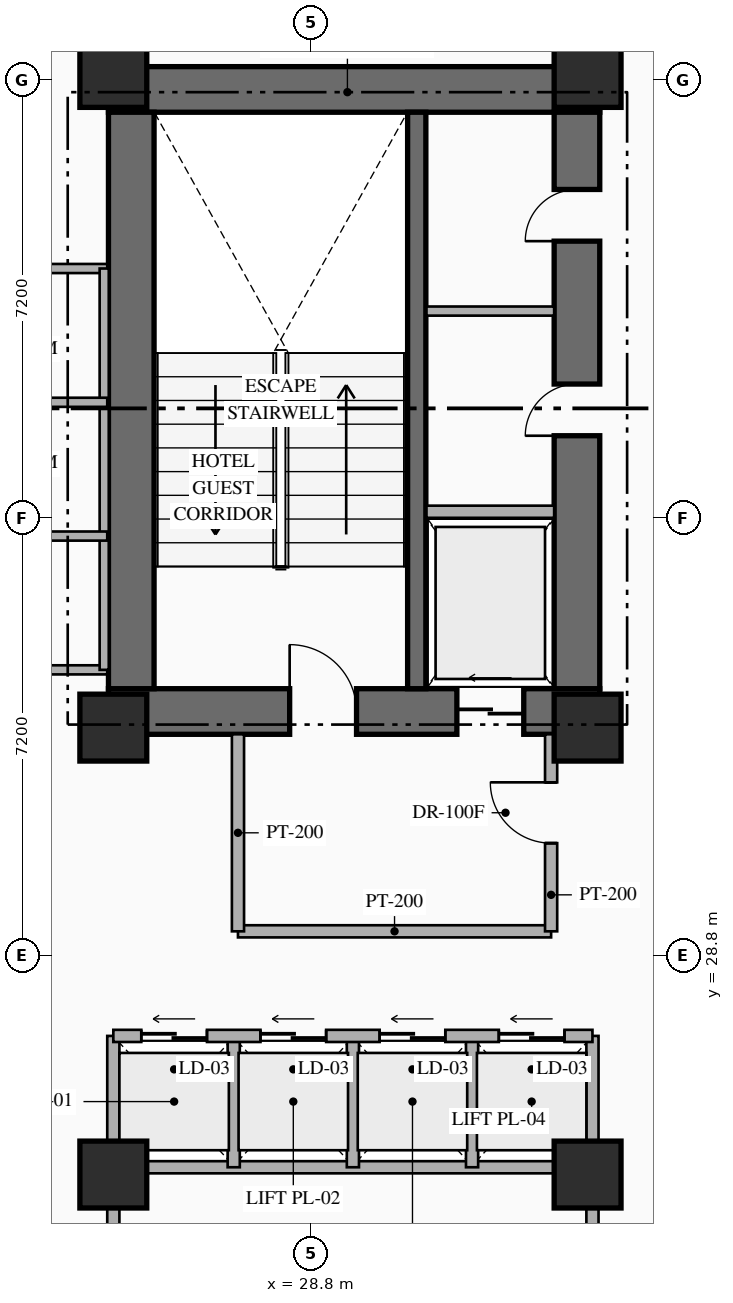
"""IFC4 building model, lengths in metres.
Left out: names, types, materials, properties, quantities, classifications, styles, units other than length and angle.
Written with IfcOpenShell. Run it as: python <this file> out.ifc"""

import sys

from ifc_helpers import new_model, si_unit, direction, frame, frame_2d, origin, origin_2d, place, context, subcontext, project, spatial, rectangle, hollow_rectangle, extrude, element, fill, save


model = new_model("IFC4")
c1 = context("Model", 3, precision=1e-05, world=origin(), true_north=direction((0.0, 1.0)))
c2 = subcontext(c1, "Body", "Model", "MODEL_VIEW")
j1 = project(units=[si_unit("LENGTHUNIT", "METRE"), si_unit("PLANEANGLEUNIT", "RADIAN")], contexts=[c1])
p1 = place(None, origin())
s1 = spatial("IfcSite", under=j1, at=p1, CompositionType="ELEMENT")
p2 = place(p1, origin())
s2 = spatial("IfcBuilding", under=s1, at=p2, CompositionType="ELEMENT")
p3 = place(p2, frame((0.0, 0.0, 46.65)))
s3 = spatial("IfcBuildingStorey", under=s2, at=p3, CompositionType="ELEMENT", Elevation=46.65)
p4 = place(p3, frame((25.47, 32.815, 0.0), z_axis=(0.0, 0.0, 1.0), x_axis=(1.0, 0.0, 0.0)))
e1 = element("IfcWall", 1, at=p4, inside=s3, PredefinedType="SHEAR", context=c2, shape_type="SweptSolid", body=[
    extrude(rectangle(XDim=8.08, YDim=0.75, at=frame_2d((4.04, 0.0))), origin(), (0.0, 0.0, 1.0), 3.35),
])
p5 = place(p4, frame((2.98, 0.0, 0.0)))
e2 = element("IfcOpeningElement", 2, at=p5, cuts=e1, PredefinedType="OPENING", context=c2, shape_type="SweptSolid", body=[
    extrude(rectangle(XDim=1.1, YDim=2.2, at=frame_2d((0.55, 1.1))), frame((0.0, 0.385, 0.0), z_axis=(0.0, -1.0, 0.0), x_axis=(1.0, 0.0, 0.0)), (0.0, 0.0, 1.0), 0.77),
])
p6 = place(p4, frame((5.73, 0.0, 0.0)))
e3 = element("IfcOpeningElement", 3, at=p6, cuts=e1, PredefinedType="OPENING", context=c2, shape_type="SweptSolid", body=[
    extrude(rectangle(XDim=1.1, YDim=2.15, at=frame_2d((0.55, 1.075))), frame((0.0, 0.385, 0.0), z_axis=(0.0, -1.0, 0.0), x_axis=(1.0, 0.0, 0.0)), (0.0, 0.0, 1.0), 0.77),
])
p7 = place(p3, frame((25.47, 43.045, 0.0), z_axis=(0.0, 0.0, 1.0), x_axis=(1.0, 0.0, 0.0)))
e4 = element("IfcWall", 4, at=p7, inside=s3, PredefinedType="SHEAR", context=c2, shape_type="SweptSolid", body=[
    extrude(rectangle(XDim=8.08, YDim=0.75, at=frame_2d((4.04, 0.0))), origin(), (0.0, 0.0, 1.0), 3.35),
])
p8 = place(p3, frame((25.845, 33.19, 0.0), z_axis=(0.0, 0.0, 1.0), x_axis=(0.0, 1.0, 0.0)))
e5 = element("IfcWall", 5, at=p8, inside=s3, PredefinedType="SHEAR", context=c2, shape_type="SweptSolid", body=[
    extrude(rectangle(XDim=9.48, YDim=0.75, at=frame_2d((4.74, 0.0))), origin(), (0.0, 0.0, 1.0), 3.35),
])
p9 = place(p3, frame((33.175, 33.19, 0.0), z_axis=(0.0, 0.0, 1.0), x_axis=(0.0, 1.0, 0.0)))
e6 = element("IfcWall", 6, at=p9, inside=s3, PredefinedType="SHEAR", context=c2, shape_type="SweptSolid", body=[
    extrude(rectangle(XDim=9.48, YDim=0.75, at=frame_2d((4.74, 0.0))), origin(), (0.0, 0.0, 1.0), 3.35),
])
p10 = place(p9, frame((4.16, 0.0, 0.0)))
e7 = element("IfcOpeningElement", 7, at=p10, cuts=e6, PredefinedType="OPENING", context=c2, shape_type="SweptSolid", body=[
    extrude(rectangle(XDim=0.85, YDim=2.08, at=frame_2d((0.425, 1.04))), frame((0.0, 0.385, 0.0), z_axis=(0.0, -1.0, 0.0), x_axis=(1.0, 0.0, 0.0)), (0.0, 0.0, 1.0), 0.77),
])
p11 = place(p9, frame((7.36, 0.0, 0.0)))
e8 = element("IfcOpeningElement", 8, at=p11, cuts=e6, PredefinedType="OPENING", context=c2, shape_type="SweptSolid", body=[
    extrude(rectangle(XDim=0.85, YDim=2.08, at=frame_2d((0.425, 1.04))), frame((0.0, 0.385, 0.0), z_axis=(0.0, -1.0, 0.0), x_axis=(1.0, 0.0, 0.0)), (0.0, 0.0, 1.0), 0.77),
])
p12 = place(p3, frame((30.54, 33.19, 0.0), z_axis=(0.0, 0.0, 1.0), x_axis=(0.0, 1.0, 0.0)))
e9 = element("IfcWall", 9, at=p12, inside=s3, PredefinedType="SHEAR", context=c2, shape_type="SweptSolid", body=[
    extrude(rectangle(XDim=9.48, YDim=0.3, at=frame_2d((4.74, 0.0))), origin(), (0.0, 0.0, 1.0), 3.35),
])
for number, where, z_axis, x_axis in (
    (10, (25.55, 32.55, 0.0), (0.0, 0.0, 1.0), (1.0, 0.0, 0.0)),
    (11, (33.35, 32.55, 0.0), (0.0, 0.0, 1.0), (1.0, 0.0, 0.0)),
    (12, (25.55, 43.3, 0.0), (0.0, 0.0, 1.0), (1.0, 0.0, 0.0)),
    (13, (33.35, 43.3, 0.0), (0.0, 0.0, 1.0), (1.0, 0.0, 0.0)),
):
    element("IfcColumn", number, at=place(p3, frame(where, z_axis=z_axis, x_axis=x_axis)), inside=s3, PredefinedType="COLUMN", context=c2, shape_type="SweptSolid", body=[
        extrude(rectangle(XDim=1.1, YDim=1.1, at=origin_2d()), origin(), (0.0, 0.0, 1.0), 3.35),
    ])
for number, where, z_axis, x_axis in (
    (14, (25.55, 25.2, 0.0), (0.0, 0.0, 1.0), (1.0, 0.0, 0.0)),
    (15, (33.35, 25.2, 0.0), (0.0, 0.0, 1.0), (1.0, 0.0, 0.0)),
):
    element("IfcColumn", number, at=place(p3, frame(where, z_axis=z_axis, x_axis=x_axis)), inside=s3, PredefinedType="COLUMN", context=c2, shape_type="SweptSolid", body=[
        extrude(hollow_rectangle(XDim=1.1, YDim=1.1, WallThickness=0.04, at=origin_2d()), origin(), (0.0, 0.0, 1.0), 3.35),
    ])
p13 = place(p3, frame((30.7, 36.1, 0.0), z_axis=(0.0, 0.0, 1.0), x_axis=(1.0, 0.0, 0.0)))
e16 = element("IfcWall", 16, at=p13, inside=s3, PredefinedType="STANDARD", context=c2, shape_type="SweptSolid", body=[
    extrude(rectangle(XDim=2.1, YDim=0.2, at=frame_2d((1.05, 0.0))), origin(), (0.0, 0.0, 1.0), 3.13),
])
p14 = place(p3, frame((30.7, 39.4, 0.0), z_axis=(0.0, 0.0, 1.0), x_axis=(1.0, 0.0, 0.0)))
e17 = element("IfcWall", 17, at=p14, inside=s3, PredefinedType="PARTITIONING", context=c2, shape_type="SweptSolid", body=[
    extrude(rectangle(XDim=2.1, YDim=0.15, at=frame_2d((1.05, 0.0))), origin(), (0.0, 0.0, 1.0), 3.13),
])
p15 = place(p3, frame((27.6, 29.2, 0.0), z_axis=(0.0, 0.0, 1.0), x_axis=(1.0, 0.0, 0.0)))
e18 = element("IfcWall", 18, at=p15, inside=s3, PredefinedType="STANDARD", context=c2, shape_type="SweptSolid", body=[
    extrude(rectangle(XDim=5.15, YDim=0.2, at=frame_2d((2.575, 0.0))), origin(), (0.0, 0.0, 1.0), 3.13),
])
p16 = place(p3, frame((27.6, 29.2, 0.0), z_axis=(0.0, 0.0, 1.0), x_axis=(0.0, 1.0, 0.0)))
e19 = element("IfcWall", 19, at=p16, inside=s3, PredefinedType="STANDARD", context=c2, shape_type="SweptSolid", body=[
    extrude(rectangle(XDim=3.24, YDim=0.2, at=frame_2d((1.62, 0.0))), origin(), (0.0, 0.0, 1.0), 3.13),
])
p17 = place(p3, frame((32.75, 29.2, 0.0), z_axis=(0.0, 0.0, 1.0), x_axis=(0.0, 1.0, 0.0)))
e20 = element("IfcWall", 20, at=p17, inside=s3, PredefinedType="STANDARD", context=c2, shape_type="SweptSolid", body=[
    extrude(rectangle(XDim=3.24, YDim=0.2, at=frame_2d((1.62, 0.0))), origin(), (0.0, 0.0, 1.0), 3.13),
])
p18 = place(p17, frame((1.45, 0.0, 0.0)))
e21 = element("IfcOpeningElement", 21, at=p18, cuts=e20, PredefinedType="OPENING", context=c2, shape_type="SweptSolid", body=[
    extrude(rectangle(XDim=1.0, YDim=2.2, at=frame_2d((0.5, 1.1))), frame((0.0, 0.11, 0.0), z_axis=(0.0, -1.0, 0.0), x_axis=(1.0, 0.0, 0.0)), (0.0, 0.0, 1.0), 0.22),
])
for number, where, z_axis, x_axis in (
    (22, (25.55, 23.4, 0.0), (0.0, 0.0, 1.0), (0.0, 1.0, 0.0)),
    (23, (33.43, 23.4, 0.0), (0.0, 0.0, 1.0), (0.0, 1.0, 0.0)),
):
    element("IfcWall", number, at=place(p3, frame(where, z_axis=z_axis, x_axis=x_axis)), inside=s3, PredefinedType="STANDARD", context=c2, shape_type="SweptSolid", body=[
        extrude(rectangle(XDim=4.08, YDim=0.2, at=frame_2d((2.04, 0.0))), origin(), (0.0, 0.0, 1.0), 2.425),
    ])
p19 = place(p3, frame((25.55, 25.32, 0.0), z_axis=(0.0, 0.0, 1.0), x_axis=(1.0, 0.0, 0.0)))
e24 = element("IfcWall", 24, at=p19, inside=s3, PredefinedType="STANDARD", context=c2, shape_type="SweptSolid", body=[
    extrude(rectangle(XDim=7.88, YDim=0.2, at=frame_2d((3.94, 0.0))), origin(), (0.0, 0.0, 1.0), 2.525),
])
for number, where, z_axis, x_axis in (
    (25, (27.53, 25.32, 0.0), (0.0, 0.0, 1.0), (0.0, 1.0, 0.0)),
    (26, (29.49, 25.32, 0.0), (0.0, 0.0, 1.0), (0.0, 1.0, 0.0)),
    (27, (31.45, 25.32, 0.0), (0.0, 0.0, 1.0), (0.0, 1.0, 0.0)),
):
    element("IfcWall", number, at=place(p3, frame(where, z_axis=z_axis, x_axis=x_axis)), inside=s3, PredefinedType="STANDARD", context=c2, shape_type="SweptSolid", body=[
        extrude(rectangle(XDim=2.16, YDim=0.2, at=frame_2d((1.08, 0.0))), origin(), (0.0, 0.0, 1.0), 3.13),
    ])
p20 = place(p3, frame((25.55, 27.48, 0.0), z_axis=(0.0, 0.0, 1.0), x_axis=(1.0, 0.0, 0.0)))
e28 = element("IfcWall", 28, at=p20, inside=s3, PredefinedType="STANDARD", context=c2, shape_type="SweptSolid", body=[
    extrude(rectangle(XDim=7.88, YDim=0.2, at=frame_2d((3.94, 0.0))), origin(), (0.0, 0.0, 1.0), 3.13),
])
p21 = place(p20, frame((0.46, 0.0, 0.0)))
e29 = element("IfcOpeningElement", 29, at=p21, cuts=e28, PredefinedType="OPENING", context=c2, shape_type="SweptSolid", body=[
    extrude(rectangle(XDim=1.08, YDim=2.15, at=frame_2d((0.54, 1.075))), frame((0.0, 0.11, 0.0), z_axis=(0.0, -1.0, 0.0), x_axis=(1.0, 0.0, 0.0)), (0.0, 0.0, 1.0), 0.22),
])
p22 = place(p20, frame((2.42, 0.0, 0.0)))
e30 = element("IfcOpeningElement", 30, at=p22, cuts=e28, PredefinedType="OPENING", context=c2, shape_type="SweptSolid", body=[
    extrude(rectangle(XDim=1.08, YDim=2.15, at=frame_2d((0.54, 1.075))), frame((0.0, 0.11, 0.0), z_axis=(0.0, -1.0, 0.0), x_axis=(1.0, 0.0, 0.0)), (0.0, 0.0, 1.0), 0.22),
])
p23 = place(p20, frame((4.38, 0.0, 0.0)))
e31 = element("IfcOpeningElement", 31, at=p23, cuts=e28, PredefinedType="OPENING", context=c2, shape_type="SweptSolid", body=[
    extrude(rectangle(XDim=1.08, YDim=2.15, at=frame_2d((0.54, 1.075))), frame((0.0, 0.11, 0.0), z_axis=(0.0, -1.0, 0.0), x_axis=(1.0, 0.0, 0.0)), (0.0, 0.0, 1.0), 0.22),
])
p24 = place(p20, frame((6.34, 0.0, 0.0)))
e32 = element("IfcOpeningElement", 32, at=p24, cuts=e28, PredefinedType="OPENING", context=c2, shape_type="SweptSolid", body=[
    extrude(rectangle(XDim=1.08, YDim=2.15, at=frame_2d((0.54, 1.075))), frame((0.0, 0.11, 0.0), z_axis=(0.0, -1.0, 0.0), x_axis=(1.0, 0.0, 0.0)), (0.0, 0.0, 1.0), 0.22),
])
for number, where, z_axis, x_axis in (
    (33, (22.15, 33.5, 0.0), (0.0, 0.0, 1.0), (1.0, 0.0, 0.0)),
    (34, (22.15, 40.1, 0.0), (0.0, 0.0, 1.0), (1.0, 0.0, 0.0)),
):
    element("IfcWall", number, at=place(p3, frame(where, z_axis=z_axis, x_axis=x_axis)), inside=s3, PredefinedType="PARTITIONING", context=c2, shape_type="SweptSolid", body=[
        extrude(rectangle(XDim=3.3, YDim=0.15, at=frame_2d((1.65, 0.0))), origin(), (0.0, 0.0, 1.0), 3.13),
    ])
p25 = place(p3, frame((25.4, 33.5, 0.0), z_axis=(0.0, 0.0, 1.0), x_axis=(0.0, 1.0, 0.0)))
e35 = element("IfcWall", 35, at=p25, inside=s3, PredefinedType="PARTITIONING", context=c2, shape_type="SweptSolid", body=[
    extrude(rectangle(XDim=6.6, YDim=0.15, at=frame_2d((3.3, 0.0))), origin(), (0.0, 0.0, 1.0), 3.13),
])
for number, where, z_axis, x_axis in (
    (36, (22.15, 35.7, 0.0), (0.0, 0.0, 1.0), (1.0, 0.0, 0.0)),
    (37, (22.15, 37.9, 0.0), (0.0, 0.0, 1.0), (1.0, 0.0, 0.0)),
):
    element("IfcWall", number, at=place(p3, frame(where, z_axis=z_axis, x_axis=x_axis)), inside=s3, PredefinedType="PARTITIONING", context=c2, shape_type="SweptSolid", body=[
        extrude(rectangle(XDim=3.3, YDim=0.15, at=frame_2d((1.65, 0.0))), origin(), (0.0, 0.0, 1.0), 3.13),
    ])
p26 = place(p3, frame((33.384, 17.312, 0.0), z_axis=(0.0, 0.0, 1.0), x_axis=(0.600008743659, 0.799993442181, 0.0)))
e38 = element("IfcWall", 38, at=p26, inside=s3, PredefinedType="PARTITIONING", context=c2, shape_type="SweptSolid", body=[
    extrude(rectangle(XDim=8.935, YDim=0.15, at=frame_2d((4.468, 0.0))), origin(), (0.0, 0.0, 1.0), 3.13),
])
p27 = place(p5, origin())
e39 = element("IfcDoor", 39, at=p27, inside=s3, OperationType="SINGLE_SWING_LEFT", PredefinedType="DOOR", context=c2, shape_type="SweptSolid", body=[
    extrude(rectangle(XDim=1.1, YDim=2.2, at=frame_2d((0.55, 1.1))), frame((0.0, 0.025, 0.0), z_axis=(0.0, -1.0, 0.0), x_axis=(1.0, 0.0, 0.0)), (0.0, 0.0, 1.0), 0.05),
])
fill(e2, e39)
p28 = place(p6, origin())
e40 = element("IfcDoor", 40, at=p28, inside=s3, OperationType="SLIDING_TO_LEFT", PredefinedType="USERDEFINED", context=c2, shape_type="SweptSolid", body=[
    extrude(rectangle(XDim=1.1, YDim=2.15, at=frame_2d((0.55, 1.075))), frame((0.0, 0.025, 0.0), z_axis=(0.0, -1.0, 0.0), x_axis=(1.0, 0.0, 0.0)), (0.0, 0.0, 1.0), 0.05),
])
fill(e3, e40)
p29 = place(p10, origin())
e41 = element("IfcDoor", 41, at=p29, inside=s3, OperationType="SINGLE_SWING_LEFT", PredefinedType="DOOR", context=c2, shape_type="SweptSolid", body=[
    extrude(rectangle(XDim=0.85, YDim=2.08, at=frame_2d((0.425, 1.04))), frame((0.0, 0.025, 0.0), z_axis=(0.0, -1.0, 0.0), x_axis=(1.0, 0.0, 0.0)), (0.0, 0.0, 1.0), 0.05),
])
fill(e7, e41)
p30 = place(p11, origin())
e42 = element("IfcDoor", 42, at=p30, inside=s3, OperationType="SINGLE_SWING_LEFT", PredefinedType="DOOR", context=c2, shape_type="SweptSolid", body=[
    extrude(rectangle(XDim=0.85, YDim=2.08, at=frame_2d((0.425, 1.04))), frame((0.0, 0.025, 0.0), z_axis=(0.0, -1.0, 0.0), x_axis=(1.0, 0.0, 0.0)), (0.0, 0.0, 1.0), 0.05),
])
fill(e8, e42)
p31 = place(p18, origin())
e43 = element("IfcDoor", 43, at=p31, inside=s3, OperationType="SINGLE_SWING_RIGHT", PredefinedType="DOOR", context=c2, shape_type="SweptSolid", body=[
    extrude(rectangle(XDim=1.0, YDim=2.2, at=frame_2d((0.5, 1.1))), frame((0.0, 0.025, 0.0), z_axis=(0.0, -1.0, 0.0), x_axis=(1.0, 0.0, 0.0)), (0.0, 0.0, 1.0), 0.05),
])
fill(e21, e43)
p32 = place(p21, origin())
e44 = element("IfcDoor", 44, at=p32, inside=s3, OperationType="SLIDING_TO_LEFT", PredefinedType="USERDEFINED", context=c2, shape_type="SweptSolid", body=[
    extrude(rectangle(XDim=1.08, YDim=2.15, at=frame_2d((0.54, 1.075))), frame((0.0, 0.025, 0.0), z_axis=(0.0, -1.0, 0.0), x_axis=(1.0, 0.0, 0.0)), (0.0, 0.0, 1.0), 0.05),
])
fill(e29, e44)
p33 = place(p22, origin())
e45 = element("IfcDoor", 45, at=p33, inside=s3, OperationType="SLIDING_TO_LEFT", PredefinedType="USERDEFINED", context=c2, shape_type="SweptSolid", body=[
    extrude(rectangle(XDim=1.08, YDim=2.15, at=frame_2d((0.54, 1.075))), frame((0.0, 0.025, 0.0), z_axis=(0.0, -1.0, 0.0), x_axis=(1.0, 0.0, 0.0)), (0.0, 0.0, 1.0), 0.05),
])
fill(e30, e45)
p34 = place(p23, origin())
e46 = element("IfcDoor", 46, at=p34, inside=s3, OperationType="SLIDING_TO_LEFT", PredefinedType="USERDEFINED", context=c2, shape_type="SweptSolid", body=[
    extrude(rectangle(XDim=1.08, YDim=2.15, at=frame_2d((0.54, 1.075))), frame((0.0, 0.025, 0.0), z_axis=(0.0, -1.0, 0.0), x_axis=(1.0, 0.0, 0.0)), (0.0, 0.0, 1.0), 0.05),
])
fill(e31, e46)
p35 = place(p24, origin())
e47 = element("IfcDoor", 47, at=p35, inside=s3, OperationType="SLIDING_TO_LEFT", PredefinedType="USERDEFINED", context=c2, shape_type="SweptSolid", body=[
    extrude(rectangle(XDim=1.08, YDim=2.15, at=frame_2d((0.54, 1.075))), frame((0.0, 0.025, 0.0), z_axis=(0.0, -1.0, 0.0), x_axis=(1.0, 0.0, 0.0)), (0.0, 0.0, 1.0), 0.05),
])
fill(e32, e47)
save(model, sys.argv[1])
